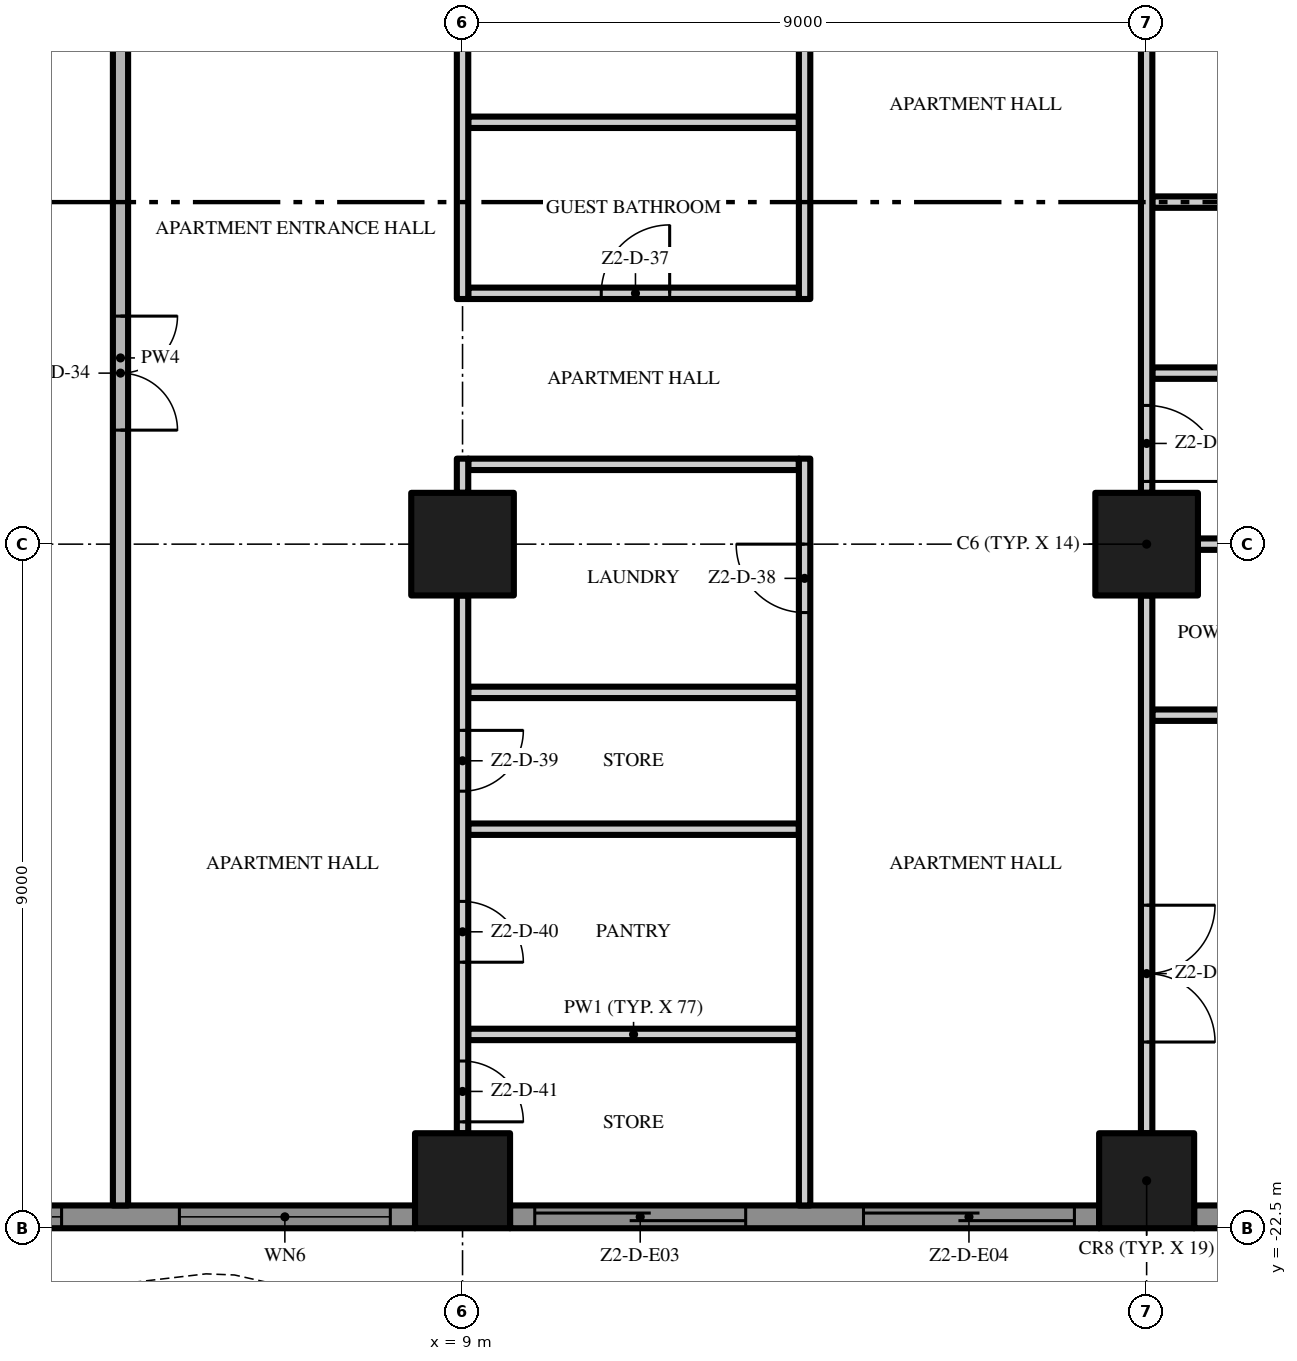
"""IFC4 building model, lengths in metres.
Left out: names, types, materials, properties, quantities, classifications, styles, units other than length and angle.
Written with IfcOpenShell. Run it as: python <this file> out.ifc"""

import sys

from ifc_helpers import new_model, si_unit, direction, frame, frame_2d, origin, origin_2d, place, context, subcontext, project, spatial, polyline, rectangle, outline, extrude, element, fill, save


model = new_model("IFC4")
c1 = context("Model", 3, precision=1e-05, world=origin(), true_north=direction((0.0, 1.0)))
c2 = subcontext(c1, "Body", "Model", "MODEL_VIEW")
j1 = project(units=[si_unit("LENGTHUNIT", "METRE"), si_unit("PLANEANGLEUNIT", "RADIAN")], contexts=[c1])
p1 = place(None, origin())
s1 = spatial("IfcSite", under=j1, at=p1, CompositionType="ELEMENT")
p2 = place(p1, origin())
s2 = spatial("IfcBuilding", under=s1, at=p2, CompositionType="ELEMENT")
p3 = place(p2, frame((0.0, 0.0, 103.6)))
s3 = spatial("IfcBuildingStorey", under=s2, at=p3, CompositionType="ELEMENT", Elevation=103.6)
p4 = place(p3, frame((18.0, -13.5, 0.0), z_axis=(0.0, 0.0, 1.0), x_axis=(1.0, 0.0, 0.0)))
e1 = element("IfcColumn", 1, at=p4, inside=s3, PredefinedType="COLUMN", context=c2, shape_type="SweptSolid", body=[
    extrude(rectangle(XDim=1.35, YDim=1.35, at=origin_2d()), origin(), (0.0, 0.0, 1.0), 3.5),
])
p5 = place(p3, frame((18.0, -21.875, 0.0), z_axis=(0.0, 0.0, 1.0), x_axis=(1.0, 0.0, 0.0)))
e2 = element("IfcColumn", 2, at=p5, inside=s3, PredefinedType="COLUMN", context=c2, shape_type="SweptSolid", body=[
    extrude(rectangle(XDim=1.25, YDim=1.25, at=origin_2d()), origin(), (0.0, 0.0, 1.0), 3.5),
])
p6 = place(p3, frame((9.0, -13.5, 0.0), z_axis=(0.0, 0.0, 1.0), x_axis=(1.0, 0.0, 0.0)))
e3 = element("IfcColumn", 3, at=p6, inside=s3, PredefinedType="COLUMN", context=c2, shape_type="SweptSolid", body=[
    extrude(rectangle(XDim=1.35, YDim=1.35, at=origin_2d()), origin(), (0.0, 0.0, 1.0), 3.5),
])
p7 = place(p3, frame((9.0, -21.875, 0.0), z_axis=(0.0, 0.0, 1.0), x_axis=(1.0, 0.0, 0.0)))
e4 = element("IfcColumn", 4, at=p7, inside=s3, PredefinedType="COLUMN", context=c2, shape_type="SweptSolid", body=[
    extrude(rectangle(XDim=1.25, YDim=1.25, at=origin_2d()), origin(), (0.0, 0.0, 1.0), 3.5),
])
p8 = place(p3, frame((8.375, -22.35, 0.0), z_axis=(0.0, 0.0, 1.0), x_axis=(-1.0, 0.0, 0.0)))
e5 = element("IfcWall", 5, at=p8, inside=s3, PredefinedType="SOLIDWALL", context=c2, shape_type="SweptSolid", body=[
    extrude(rectangle(XDim=7.75, YDim=0.3, at=frame_2d((3.875, 0.0))), origin(), (0.0, 0.0, 1.0), 3.5),
])
p9 = place(p8, frame((4.65, 0.0, 0.45)))
e6 = element("IfcOpeningElement", 6, at=p9, cuts=e5, PredefinedType="OPENING", context=c2, shape_type="SweptSolid", body=[
    extrude(rectangle(XDim=2.775, YDim=2.65, at=frame_2d((1.387, 1.325))), frame((0.0, 0.16, 0.0), z_axis=(0.0, -1.0, 0.0), x_axis=(1.0, 0.0, 0.0)), (0.0, 0.0, 1.0), 0.32),
])
p10 = place(p8, frame((0.325, 0.0, 0.45)))
e7 = element("IfcOpeningElement", 7, at=p10, cuts=e5, PredefinedType="OPENING", context=c2, shape_type="SweptSolid", body=[
    extrude(rectangle(XDim=2.775, YDim=2.65, at=frame_2d((1.387, 1.325))), frame((0.0, 0.16, 0.0), z_axis=(0.0, -1.0, 0.0), x_axis=(1.0, 0.0, 0.0)), (0.0, 0.0, 1.0), 0.32),
])
p11 = place(p3, frame((17.375, -22.35, 0.0), z_axis=(0.0, 0.0, 1.0), x_axis=(-1.0, 0.0, 0.0)))
e8 = element("IfcWall", 8, at=p11, inside=s3, PredefinedType="SOLIDWALL", context=c2, shape_type="SweptSolid", body=[
    extrude(rectangle(XDim=7.75, YDim=0.3, at=frame_2d((3.875, 0.0))), origin(), (0.0, 0.0, 1.0), 3.5),
])
p12 = place(p11, frame((4.65, 0.0, 0.0)))
e9 = element("IfcOpeningElement", 9, at=p12, cuts=e8, PredefinedType="OPENING", context=c2, shape_type="SweptSolid", body=[
    extrude(rectangle(XDim=2.775, YDim=2.4, at=frame_2d((1.387, 1.2))), frame((0.0, 0.16, 0.0), z_axis=(0.0, -1.0, 0.0), x_axis=(1.0, 0.0, 0.0)), (0.0, 0.0, 1.0), 0.32),
])
p13 = place(p11, frame((0.325, 0.0, 0.0)))
e10 = element("IfcOpeningElement", 10, at=p13, cuts=e8, PredefinedType="OPENING", context=c2, shape_type="SweptSolid", body=[
    extrude(rectangle(XDim=2.775, YDim=2.4, at=frame_2d((1.387, 1.2))), frame((0.0, 0.16, 0.0), z_axis=(0.0, -1.0, 0.0), x_axis=(1.0, 0.0, 0.0)), (0.0, 0.0, 1.0), 0.32),
])
p14 = place(p3, frame((22.5, -22.35, 0.0), z_axis=(0.0, 0.0, 1.0), x_axis=(-1.0, 0.0, 0.0)))
e11 = element("IfcWall", 11, at=p14, inside=s3, PredefinedType="SOLIDWALL", context=c2, shape_type="SweptSolid", body=[
    extrude(rectangle(XDim=3.875, YDim=0.3, at=frame_2d((1.938, 0.0))), origin(), (0.0, 0.0, 1.0), 3.5),
])
p15 = place(p14, frame((0.775, 0.0, 0.45)))
e12 = element("IfcOpeningElement", 12, at=p15, cuts=e11, PredefinedType="OPENING", context=c2, shape_type="SweptSolid", body=[
    extrude(rectangle(XDim=2.775, YDim=2.65, at=frame_2d((1.387, 1.325))), frame((0.0, 0.16, 0.0), z_axis=(0.0, -1.0, 0.0), x_axis=(1.0, 0.0, 0.0)), (0.0, 0.0, 1.0), 0.32),
])
p16 = place(p3, origin())
e13 = element("IfcWall", 13, at=p16, inside=s3, PredefinedType="USERDEFINED", context=c2, shape_type="SweptSolid", body=[
    extrude(outline(polyline([(-22.5, -23.451), (-21.0, -24.112), (-19.5, -24.845), (-18.0, -25.369), (-16.875, -25.5), (-16.5, -25.485), (-15.0, -25.149), (-13.5, -24.488), (-12.0, -23.755), (-10.5, -23.231), (-9.375, -23.1), (-9.0, -23.115), (-7.5, -23.451), (-6.0, -24.112), (-4.5, -24.845), (-3.0, -25.369), (-1.875, -25.5), (-1.5, -25.485), (0.0, -25.149), (1.5, -24.488), (3.0, -23.755), (4.5, -23.231), (5.625, -23.1), (6.0, -23.115), (7.5, -23.451), (9.0, -24.112), (10.5, -24.845), (12.0, -25.369), (13.125, -25.5), (13.5, -25.485), (15.0, -25.149), (16.5, -24.488), (18.0, -23.755), (19.5, -23.231), (20.625, -23.1), (21.0, -23.115), (22.5, -23.451), (22.555, -23.208), (21.033, -22.866), (20.615, -22.849), (19.444, -22.986), (17.904, -23.524), (16.395, -24.261), (14.921, -24.91), (13.467, -25.236), (13.135, -25.249), (12.056, -25.124), (10.596, -24.614), (9.105, -23.885), (7.579, -23.213), (6.033, -22.866), (5.615, -22.849), (4.444, -22.986), (2.904, -23.524), (1.395, -24.261), (-0.079, -24.91), (-1.533, -25.236), (-1.865, -25.249), (-2.944, -25.124), (-4.404, -24.614), (-5.895, -23.885), (-7.421, -23.213), (-8.967, -22.866), (-9.385, -22.849), (-10.556, -22.986), (-12.096, -23.524), (-13.605, -24.261), (-15.079, -24.91), (-16.533, -25.236), (-16.865, -25.249), (-17.944, -25.124), (-19.404, -24.614), (-20.895, -23.885), (-22.399, -23.223), (-22.5, -23.451)])), origin(), (0.0, 0.0, 1.0), 0.9),
])
for number, where, z_axis, x_axis in (
    (14, (9.075, -19.95, 0.0), (0.0, 0.0, 1.0), (1.0, 0.0, 0.0)),
    (15, (9.075, -17.25, 0.0), (0.0, 0.0, 1.0), (1.0, 0.0, 0.0)),
):
    element("IfcWall", number, at=place(p3, frame(where, z_axis=z_axis, x_axis=x_axis)), inside=s3, PredefinedType="PARTITIONING", context=c2, shape_type="SweptSolid", body=[
        extrude(rectangle(XDim=4.35, YDim=0.15, at=frame_2d((2.175, 0.0))), origin(), (0.0, 0.0, 1.0), 3.5),
    ])
p17 = place(p3, frame((18.075, -15.75, 0.0), z_axis=(0.0, 0.0, 1.0), x_axis=(1.0, 0.0, 0.0)))
e16 = element("IfcWall", 16, at=p17, inside=s3, PredefinedType="PARTITIONING", context=c2, shape_type="SweptSolid", body=[
    extrude(rectangle(XDim=2.85, YDim=0.15, at=frame_2d((1.425, 0.0))), origin(), (0.0, 0.0, 1.0), 3.5),
])
p18 = place(p3, frame((9.075, -15.45, 0.0), z_axis=(0.0, 0.0, 1.0), x_axis=(1.0, 0.0, 0.0)))
e17 = element("IfcWall", 17, at=p18, inside=s3, PredefinedType="PARTITIONING", context=c2, shape_type="SweptSolid", body=[
    extrude(rectangle(XDim=4.35, YDim=0.15, at=frame_2d((2.175, 0.0))), origin(), (0.0, 0.0, 1.0), 3.5),
])
p19 = place(p3, frame((18.675, -13.5, 0.0), z_axis=(0.0, 0.0, 1.0), x_axis=(1.0, 0.0, 0.0)))
e18 = element("IfcWall", 18, at=p19, inside=s3, PredefinedType="PARTITIONING", context=c2, shape_type="SweptSolid", body=[
    extrude(rectangle(XDim=7.075, YDim=0.15, at=frame_2d((3.538, 0.0))), origin(), (0.0, 0.0, 1.0), 3.5),
])
p20 = place(p3, frame((9.075, -12.45, 0.0), z_axis=(0.0, 0.0, 1.0), x_axis=(1.0, 0.0, 0.0)))
e19 = element("IfcWall", 19, at=p20, inside=s3, PredefinedType="PARTITIONING", context=c2, shape_type="SweptSolid", body=[
    extrude(rectangle(XDim=4.35, YDim=0.15, at=frame_2d((2.175, 0.0))), origin(), (0.0, 0.0, 1.0), 3.5),
])
p21 = place(p3, frame((18.075, -11.25, 0.0), z_axis=(0.0, 0.0, 1.0), x_axis=(1.0, 0.0, 0.0)))
e20 = element("IfcWall", 20, at=p21, inside=s3, PredefinedType="PARTITIONING", context=c2, shape_type="SweptSolid", body=[
    extrude(rectangle(XDim=2.85, YDim=0.15, at=frame_2d((1.425, 0.0))), origin(), (0.0, 0.0, 1.0), 3.5),
])
p22 = place(p3, frame((9.075, -10.2, 0.0), z_axis=(0.0, 0.0, 1.0), x_axis=(1.0, 0.0, 0.0)))
e21 = element("IfcWall", 21, at=p22, inside=s3, PredefinedType="PARTITIONING", context=c2, shape_type="SweptSolid", body=[
    extrude(rectangle(XDim=4.35, YDim=0.15, at=frame_2d((2.175, 0.0))), origin(), (0.0, 0.0, 1.0), 3.5),
])
p23 = place(p22, frame((1.75, 0.0, 0.0)))
e22 = element("IfcOpeningElement", 22, at=p23, cuts=e21, PredefinedType="OPENING", context=c2, shape_type="SweptSolid", body=[
    extrude(rectangle(XDim=0.9, YDim=2.1, at=frame_2d((0.45, 1.05))), frame((0.0, 0.085, 0.0), z_axis=(0.0, -1.0, 0.0), x_axis=(1.0, 0.0, 0.0)), (0.0, 0.0, 1.0), 0.17),
])
p24 = place(p3, frame((18.075, -9.0, 0.0), z_axis=(0.0, 0.0, 1.0), x_axis=(1.0, 0.0, 0.0)))
e23 = element("IfcWall", 23, at=p24, inside=s3, PredefinedType="PARTITIONING", context=c2, shape_type="SweptSolid", body=[
    extrude(rectangle(XDim=2.85, YDim=0.15, at=frame_2d((1.425, 0.0))), origin(), (0.0, 0.0, 1.0), 3.5),
])
p25 = place(p3, frame((9.075, -7.95, 0.0), z_axis=(0.0, 0.0, 1.0), x_axis=(1.0, 0.0, 0.0)))
e24 = element("IfcWall", 24, at=p25, inside=s3, PredefinedType="PARTITIONING", context=c2, shape_type="SweptSolid", body=[
    extrude(rectangle(XDim=4.35, YDim=0.15, at=frame_2d((2.175, 0.0))), origin(), (0.0, 0.0, 1.0), 3.5),
])
p26 = place(p3, frame((4.5, 0.1, 0.0), z_axis=(0.0, 0.0, 1.0), x_axis=(0.0, -1.0, 0.0)))
e25 = element("IfcWall", 25, at=p26, inside=s3, PredefinedType="PARTITIONING", context=c2, shape_type="SweptSolid", body=[
    extrude(rectangle(XDim=22.3, YDim=0.2, at=frame_2d((11.15, 0.0))), origin(), (0.0, 0.0, 1.0), 3.5),
])
p27 = place(p26, frame((10.6, 0.0, 0.0)))
e26 = element("IfcOpeningElement", 26, at=p27, cuts=e25, PredefinedType="OPENING", context=c2, shape_type="SweptSolid", body=[
    extrude(rectangle(XDim=1.5, YDim=2.4, at=frame_2d((0.75, 1.2))), frame((0.0, 0.11, 0.0), z_axis=(0.0, -1.0, 0.0), x_axis=(1.0, 0.0, 0.0)), (0.0, 0.0, 1.0), 0.22),
])
p28 = place(p3, frame((9.0, -14.175, 0.0), z_axis=(0.0, 0.0, 1.0), x_axis=(0.0, -1.0, 0.0)))
e27 = element("IfcWall", 27, at=p28, inside=s3, PredefinedType="PARTITIONING", context=c2, shape_type="SweptSolid", body=[
    extrude(rectangle(XDim=7.075, YDim=0.15, at=frame_2d((3.538, 0.0))), origin(), (0.0, 0.0, 1.0), 3.5),
])
p29 = place(p28, frame((1.775, 0.0, 0.0)))
e28 = element("IfcOpeningElement", 28, at=p29, cuts=e27, PredefinedType="OPENING", context=c2, shape_type="SweptSolid", body=[
    extrude(rectangle(XDim=0.8, YDim=2.0, at=frame_2d((0.4, 1.0))), frame((0.0, 0.085, 0.0), z_axis=(0.0, -1.0, 0.0), x_axis=(1.0, 0.0, 0.0)), (0.0, 0.0, 1.0), 0.17),
])
p30 = place(p28, frame((4.025, 0.0, 0.0)))
e29 = element("IfcOpeningElement", 29, at=p30, cuts=e27, PredefinedType="OPENING", context=c2, shape_type="SweptSolid", body=[
    extrude(rectangle(XDim=0.8, YDim=2.0, at=frame_2d((0.4, 1.0))), frame((0.0, 0.085, 0.0), z_axis=(0.0, -1.0, 0.0), x_axis=(1.0, 0.0, 0.0)), (0.0, 0.0, 1.0), 0.17),
])
p31 = place(p28, frame((6.125, 0.0, 0.0)))
e30 = element("IfcOpeningElement", 30, at=p31, cuts=e27, PredefinedType="OPENING", context=c2, shape_type="SweptSolid", body=[
    extrude(rectangle(XDim=0.8, YDim=2.0, at=frame_2d((0.4, 1.0))), frame((0.0, 0.085, 0.0), z_axis=(0.0, -1.0, 0.0), x_axis=(1.0, 0.0, 0.0)), (0.0, 0.0, 1.0), 0.17),
])
p32 = place(p3, frame((9.0, -12.825, 0.0), z_axis=(0.0, 0.0, 1.0), x_axis=(0.0, 1.0, 0.0)))
e31 = element("IfcWall", 31, at=p32, inside=s3, PredefinedType="PARTITIONING", context=c2, shape_type="SweptSolid", body=[
    extrude(rectangle(XDim=0.45, YDim=0.15, at=frame_2d((0.225, 0.0))), origin(), (0.0, 0.0, 1.0), 3.5),
])
p33 = place(p3, frame((9.0, -5.175, 0.0), z_axis=(0.0, 0.0, 1.0), x_axis=(0.0, -1.0, 0.0)))
e32 = element("IfcWall", 32, at=p33, inside=s3, PredefinedType="PARTITIONING", context=c2, shape_type="SweptSolid", body=[
    extrude(rectangle(XDim=5.1, YDim=0.15, at=frame_2d((2.55, 0.0))), origin(), (0.0, 0.0, 1.0), 3.5),
])
p34 = place(p33, frame((0.15, 0.0, 0.0)))
e33 = element("IfcOpeningElement", 33, at=p34, cuts=e32, PredefinedType="OPENING", context=c2, shape_type="SweptSolid", body=[
    extrude(rectangle(XDim=1.0, YDim=2.4, at=frame_2d((0.5, 1.2))), frame((0.0, 0.085, 0.0), z_axis=(0.0, -1.0, 0.0), x_axis=(1.0, 0.0, 0.0)), (0.0, 0.0, 1.0), 0.17),
])
p35 = place(p3, frame((13.5, -22.2, 0.0), z_axis=(0.0, 0.0, 1.0), x_axis=(0.0, 1.0, 0.0)))
e34 = element("IfcWall", 34, at=p35, inside=s3, PredefinedType="PARTITIONING", context=c2, shape_type="SweptSolid", body=[
    extrude(rectangle(XDim=9.825, YDim=0.15, at=frame_2d((4.912, 0.0))), origin(), (0.0, 0.0, 1.0), 3.5),
])
p36 = place(p35, frame((7.8, 0.0, 0.0)))
e35 = element("IfcOpeningElement", 35, at=p36, cuts=e34, PredefinedType="OPENING", context=c2, shape_type="SweptSolid", body=[
    extrude(rectangle(XDim=0.9, YDim=2.1, at=frame_2d((0.45, 1.05))), frame((0.0, 0.085, 0.0), z_axis=(0.0, -1.0, 0.0), x_axis=(1.0, 0.0, 0.0)), (0.0, 0.0, 1.0), 0.17),
])
p37 = place(p3, frame((13.5, -10.275, 0.0), z_axis=(0.0, 0.0, 1.0), x_axis=(0.0, 1.0, 0.0)))
e36 = element("IfcWall", 36, at=p37, inside=s3, PredefinedType="PARTITIONING", context=c2, shape_type="SweptSolid", body=[
    extrude(rectangle(XDim=10.175, YDim=0.15, at=frame_2d((5.088, 0.0))), origin(), (0.0, 0.0, 1.0), 3.5),
])
p38 = place(p3, frame((18.0, -14.175, 0.0), z_axis=(0.0, 0.0, 1.0), x_axis=(0.0, -1.0, 0.0)))
e37 = element("IfcWall", 37, at=p38, inside=s3, PredefinedType="PARTITIONING", context=c2, shape_type="SweptSolid", body=[
    extrude(rectangle(XDim=7.075, YDim=0.15, at=frame_2d((3.538, 0.0))), origin(), (0.0, 0.0, 1.0), 3.5),
])
p39 = place(p38, frame((4.075, 0.0, 0.0)))
e38 = element("IfcOpeningElement", 38, at=p39, cuts=e37, PredefinedType="OPENING", context=c2, shape_type="SweptSolid", body=[
    extrude(rectangle(XDim=1.8, YDim=2.4, at=frame_2d((0.9, 1.2))), frame((0.0, 0.085, 0.0), z_axis=(0.0, -1.0, 0.0), x_axis=(1.0, 0.0, 0.0)), (0.0, 0.0, 1.0), 0.17),
])
p40 = place(p3, frame((18.0, -5.175, 0.0), z_axis=(0.0, 0.0, 1.0), x_axis=(0.0, -1.0, 0.0)))
e39 = element("IfcWall", 39, at=p40, inside=s3, PredefinedType="PARTITIONING", context=c2, shape_type="SweptSolid", body=[
    extrude(rectangle(XDim=7.65, YDim=0.15, at=frame_2d((3.825, 0.0))), origin(), (0.0, 0.0, 1.0), 3.5),
])
p41 = place(p40, frame((0.15, 0.0, 0.0)))
e40 = element("IfcOpeningElement", 40, at=p41, cuts=e39, PredefinedType="OPENING", context=c2, shape_type="SweptSolid", body=[
    extrude(rectangle(XDim=1.0, YDim=2.4, at=frame_2d((0.5, 1.2))), frame((0.0, 0.085, 0.0), z_axis=(0.0, -1.0, 0.0), x_axis=(1.0, 0.0, 0.0)), (0.0, 0.0, 1.0), 0.17),
])
p42 = place(p40, frame((6.5, 0.0, 0.0)))
e41 = element("IfcOpeningElement", 41, at=p42, cuts=e39, PredefinedType="OPENING", context=c2, shape_type="SweptSolid", body=[
    extrude(rectangle(XDim=1.0, YDim=2.4, at=frame_2d((0.5, 1.2))), frame((0.0, 0.085, 0.0), z_axis=(0.0, -1.0, 0.0), x_axis=(1.0, 0.0, 0.0)), (0.0, 0.0, 1.0), 0.17),
])
p43 = place(p9, origin())
e42 = element("IfcWindow", 42, at=p43, inside=s3, PartitioningType="SINGLE_PANEL", PredefinedType="WINDOW", context=c2, shape_type="SweptSolid", body=[
    extrude(rectangle(XDim=2.775, YDim=2.65, at=frame_2d((1.387, 1.325))), frame((0.0, 0.03, 0.0), z_axis=(0.0, -1.0, 0.0), x_axis=(1.0, 0.0, 0.0)), (0.0, 0.0, 1.0), 0.06),
])
fill(e6, e42)
p44 = place(p10, origin())
e43 = element("IfcWindow", 43, at=p44, inside=s3, PartitioningType="SINGLE_PANEL", PredefinedType="WINDOW", context=c2, shape_type="SweptSolid", body=[
    extrude(rectangle(XDim=2.775, YDim=2.65, at=frame_2d((1.387, 1.325))), frame((0.0, 0.03, 0.0), z_axis=(0.0, -1.0, 0.0), x_axis=(1.0, 0.0, 0.0)), (0.0, 0.0, 1.0), 0.06),
])
fill(e7, e43)
p45 = place(p12, origin())
e44 = element("IfcDoor", 44, at=p45, inside=s3, OperationType="SINGLE_SWING_LEFT", PredefinedType="DOOR", context=c2, shape_type="SweptSolid", body=[
    extrude(rectangle(XDim=2.775, YDim=2.4, at=frame_2d((1.387, 1.2))), frame((0.0, 0.025, 0.0), z_axis=(0.0, -1.0, 0.0), x_axis=(1.0, 0.0, 0.0)), (0.0, 0.0, 1.0), 0.05),
])
fill(e9, e44)
p46 = place(p13, origin())
e45 = element("IfcDoor", 45, at=p46, inside=s3, OperationType="SINGLE_SWING_LEFT", PredefinedType="DOOR", context=c2, shape_type="SweptSolid", body=[
    extrude(rectangle(XDim=2.775, YDim=2.4, at=frame_2d((1.387, 1.2))), frame((0.0, 0.025, 0.0), z_axis=(0.0, -1.0, 0.0), x_axis=(1.0, 0.0, 0.0)), (0.0, 0.0, 1.0), 0.05),
])
fill(e10, e45)
p47 = place(p27, origin())
e46 = element("IfcDoor", 46, at=p47, inside=s3, OperationType="DOUBLE_DOOR_SINGLE_SWING", PredefinedType="DOOR", context=c2, shape_type="SweptSolid", body=[
    extrude(rectangle(XDim=1.5, YDim=2.4, at=frame_2d((0.75, 1.2))), frame((0.0, 0.025, 0.0), z_axis=(0.0, -1.0, 0.0), x_axis=(1.0, 0.0, 0.0)), (0.0, 0.0, 1.0), 0.05),
])
fill(e26, e46)
p48 = place(p23, origin())
e47 = element("IfcDoor", 47, at=p48, inside=s3, OperationType="SINGLE_SWING_RIGHT", PredefinedType="DOOR", context=c2, shape_type="SweptSolid", body=[
    extrude(rectangle(XDim=0.9, YDim=2.1, at=frame_2d((0.45, 1.05))), frame((0.0, 0.025, 0.0), z_axis=(0.0, -1.0, 0.0), x_axis=(1.0, 0.0, 0.0)), (0.0, 0.0, 1.0), 0.05),
])
fill(e22, e47)
p49 = place(p36, origin())
e48 = element("IfcDoor", 48, at=p49, inside=s3, OperationType="SINGLE_SWING_RIGHT", PredefinedType="DOOR", context=c2, shape_type="SweptSolid", body=[
    extrude(rectangle(XDim=0.9, YDim=2.1, at=frame_2d((0.45, 1.05))), frame((0.0, 0.025, 0.0), z_axis=(0.0, -1.0, 0.0), x_axis=(1.0, 0.0, 0.0)), (0.0, 0.0, 1.0), 0.05),
])
fill(e35, e48)
p50 = place(p29, origin())
e49 = element("IfcDoor", 49, at=p50, inside=s3, OperationType="SINGLE_SWING_LEFT", PredefinedType="DOOR", context=c2, shape_type="SweptSolid", body=[
    extrude(rectangle(XDim=0.8, YDim=2.0, at=frame_2d((0.4, 1.0))), frame((0.0, 0.025, 0.0), z_axis=(0.0, -1.0, 0.0), x_axis=(1.0, 0.0, 0.0)), (0.0, 0.0, 1.0), 0.05),
])
fill(e28, e49)
p51 = place(p30, origin())
e50 = element("IfcDoor", 50, at=p51, inside=s3, OperationType="SINGLE_SWING_RIGHT", PredefinedType="DOOR", context=c2, shape_type="SweptSolid", body=[
    extrude(rectangle(XDim=0.8, YDim=2.0, at=frame_2d((0.4, 1.0))), frame((0.0, 0.025, 0.0), z_axis=(0.0, -1.0, 0.0), x_axis=(1.0, 0.0, 0.0)), (0.0, 0.0, 1.0), 0.05),
])
fill(e29, e50)
p52 = place(p31, origin())
e51 = element("IfcDoor", 51, at=p52, inside=s3, OperationType="SINGLE_SWING_RIGHT", PredefinedType="DOOR", context=c2, shape_type="SweptSolid", body=[
    extrude(rectangle(XDim=0.8, YDim=2.0, at=frame_2d((0.4, 1.0))), frame((0.0, 0.025, 0.0), z_axis=(0.0, -1.0, 0.0), x_axis=(1.0, 0.0, 0.0)), (0.0, 0.0, 1.0), 0.05),
])
fill(e30, e51)
p53 = place(p42, origin())
e52 = element("IfcDoor", 52, at=p53, inside=s3, OperationType="SINGLE_SWING_RIGHT", PredefinedType="DOOR", context=c2, shape_type="SweptSolid", body=[
    extrude(rectangle(XDim=1.0, YDim=2.4, at=frame_2d((0.5, 1.2))), frame((0.0, 0.025, 0.0), z_axis=(0.0, -1.0, 0.0), x_axis=(1.0, 0.0, 0.0)), (0.0, 0.0, 1.0), 0.05),
])
fill(e41, e52)
p54 = place(p39, origin())
e53 = element("IfcDoor", 53, at=p54, inside=s3, OperationType="DOUBLE_DOOR_SINGLE_SWING", PredefinedType="DOOR", context=c2, shape_type="SweptSolid", body=[
    extrude(rectangle(XDim=1.8, YDim=2.4, at=frame_2d((0.9, 1.2))), frame((0.0, 0.025, 0.0), z_axis=(0.0, -1.0, 0.0), x_axis=(1.0, 0.0, 0.0)), (0.0, 0.0, 1.0), 0.05),
])
fill(e38, e53)
save(model, sys.argv[1])
